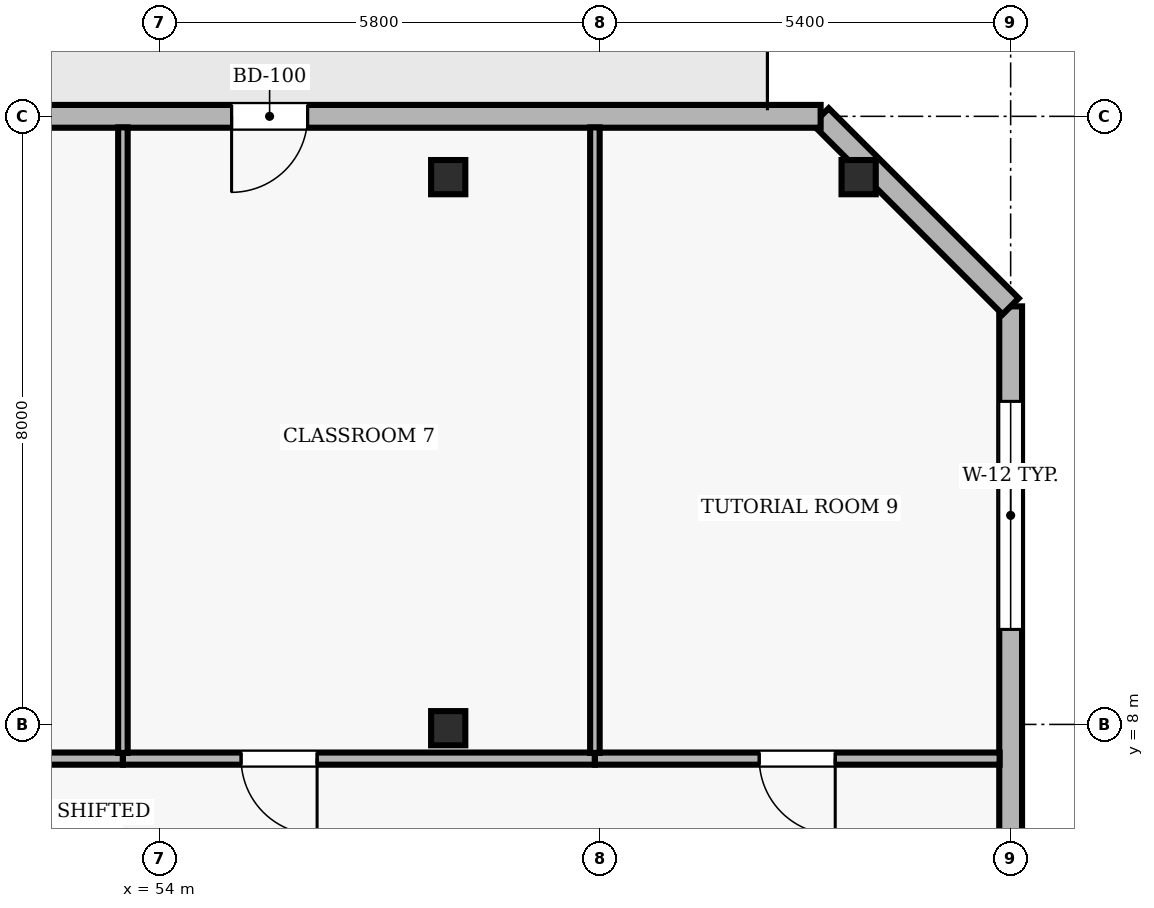
"""IFC4 building model, lengths in metres.
Left out: names, types, materials, properties, quantities, classifications, styles, units other than length and angle.
Written with IfcOpenShell. Run it as: python <this file> out.ifc"""

import sys

from ifc_helpers import new_model, si_unit, direction, frame, frame_2d, origin, origin_2d, place, context, subcontext, project, spatial, rectangle, hollow_rectangle, extrude, element, fill, save


model = new_model("IFC4")
c1 = context("Model", 3, precision=1e-05, world=origin(), true_north=direction((0.0, 1.0)))
c2 = subcontext(c1, "Body", "Model", "MODEL_VIEW")
j1 = project(units=[si_unit("LENGTHUNIT", "METRE"), si_unit("PLANEANGLEUNIT", "RADIAN")], contexts=[c1])
p1 = place(None, origin())
s1 = spatial("IfcSite", under=j1, at=p1, CompositionType="ELEMENT")
p2 = place(p1, origin())
s2 = spatial("IfcBuilding", under=s1, at=p2, CompositionType="ELEMENT")
p3 = place(p2, frame((0.0, 0.0, 234.3)))
s3 = spatial("IfcBuildingStorey", under=s2, at=p3, CompositionType="ELEMENT", Elevation=234.3)
for number, where, z_axis, x_axis in (
    (1, (57.8, 7.95, 0.0), (0.0, 0.0, 1.0), (1.0, 0.0, 0.0)),
    (2, (57.8, 15.2, 0.0), (0.0, 0.0, 1.0), (1.0, 0.0, 0.0)),
    (3, (63.2, 15.2, 0.0), (0.0, 0.0, 1.0), (1.0, 0.0, 0.0)),
):
    element("IfcColumn", number, at=place(p3, frame(where, z_axis=z_axis, x_axis=x_axis)), inside=s3, PredefinedType="COLUMN", context=c2, shape_type="SweptSolid", body=[
        extrude(hollow_rectangle(XDim=0.45, YDim=0.45, WallThickness=0.02, at=origin_2d()), origin(), (0.0, 0.0, 1.0), 3.9),
    ])
p4 = place(p3, frame((65.2, 2.5, 0.0), z_axis=(0.0, 0.0, 1.0), x_axis=(0.0, 1.0, 0.0)))
e4 = element("IfcWall", 4, at=p4, inside=s3, PredefinedType="SOLIDWALL", context=c2, shape_type="SweptSolid", body=[
    extrude(rectangle(XDim=11.0, YDim=0.3, at=frame_2d((5.5, 0.0))), origin(), (0.0, 0.0, 1.0), 3.64),
])
p5 = place(p4, frame((6.75, 0.0, 0.9)))
e5 = element("IfcOpeningElement", 5, at=p5, cuts=e4, PredefinedType="OPENING", context=c2, shape_type="SweptSolid", body=[
    extrude(rectangle(XDim=3.0, YDim=2.2, at=frame_2d((1.5, 1.1))), frame((0.0, 0.16, 0.0), z_axis=(0.0, -1.0, 0.0), x_axis=(1.0, 0.0, 0.0)), (0.0, 0.0, 1.0), 0.32),
])
p6 = place(p3, frame((65.2, 13.5, 0.0), z_axis=(0.0, 0.0, 1.0), x_axis=(-0.707106781187, 0.707106781187, 0.0)))
e6 = element("IfcWall", 6, at=p6, inside=s3, PredefinedType="SOLIDWALL", context=c2, shape_type="SweptSolid", body=[
    extrude(rectangle(XDim=3.536, YDim=0.3, at=frame_2d((1.768, 0.0))), origin(), (0.0, 0.0, 1.0), 3.64),
])
p7 = place(p3, frame((62.7, 16.0, 0.0), z_axis=(0.0, 0.0, 1.0), x_axis=(-1.0, 0.0, 0.0)))
e7 = element("IfcWall", 7, at=p7, inside=s3, PredefinedType="SOLIDWALL", context=c2, shape_type="SweptSolid", body=[
    extrude(rectangle(XDim=19.1, YDim=0.3, at=frame_2d((9.55, 0.0))), origin(), (0.0, 0.0, 1.0), 3.64),
])
p8 = place(p7, frame((6.75, 0.0, 0.0)))
e8 = element("IfcOpeningElement", 8, at=p8, cuts=e7, PredefinedType="OPENING", context=c2, shape_type="SweptSolid", body=[
    extrude(rectangle(XDim=1.0, YDim=2.2, at=frame_2d((0.5, 1.1))), frame((0.0, 0.16, 0.0), z_axis=(0.0, -1.0, 0.0), x_axis=(1.0, 0.0, 0.0)), (0.0, 0.0, 1.0), 0.32),
])
p9 = place(p7, frame((14.267, 0.0, 0.9)))
e9 = element("IfcOpeningElement", 9, at=p9, cuts=e7, PredefinedType="OPENING", context=c2, shape_type="SweptSolid", body=[
    extrude(rectangle(XDim=1.5, YDim=1.6, at=frame_2d((0.75, 0.8))), frame((0.0, 0.16, 0.0), z_axis=(0.0, -1.0, 0.0), x_axis=(1.0, 0.0, 0.0)), (0.0, 0.0, 1.0), 0.32),
])
p10 = place(p3, frame((53.52, 7.55, 0.0), z_axis=(0.0, 0.0, 1.0), x_axis=(-1.0, 0.0, 0.0)))
e10 = element("IfcWall", 10, at=p10, inside=s3, PredefinedType="PARTITIONING", context=c2, shape_type="SweptSolid", body=[
    extrude(rectangle(XDim=7.52, YDim=0.16, at=frame_2d((3.76, 0.0))), origin(), (0.0, 0.0, 1.0), 3.096),
])
p11 = place(p10, frame((3.26, 0.0, 0.0)))
e11 = element("IfcOpeningElement", 11, at=p11, cuts=e10, PredefinedType="OPENING", context=c2, shape_type="SweptSolid", body=[
    extrude(rectangle(XDim=1.0, YDim=2.1, at=frame_2d((0.5, 1.05))), frame((0.0, 0.09, 0.0), z_axis=(0.0, -1.0, 0.0), x_axis=(1.0, 0.0, 0.0)), (0.0, 0.0, 1.0), 0.18),
])
p12 = place(p3, frame((59.73, 7.55, 0.0), z_axis=(0.0, 0.0, 1.0), x_axis=(-1.0, 0.0, 0.0)))
e12 = element("IfcWall", 12, at=p12, inside=s3, PredefinedType="PARTITIONING", context=c2, shape_type="SweptSolid", body=[
    extrude(rectangle(XDim=6.21, YDim=0.16, at=frame_2d((3.105, 0.0))), origin(), (0.0, 0.0, 1.0), 3.096),
])
p13 = place(p12, frame((3.655, 0.0, 0.0)))
e13 = element("IfcOpeningElement", 13, at=p13, cuts=e12, PredefinedType="OPENING", context=c2, shape_type="SweptSolid", body=[
    extrude(rectangle(XDim=1.0, YDim=2.1, at=frame_2d((0.5, 1.05))), frame((0.0, 0.09, 0.0), z_axis=(0.0, -1.0, 0.0), x_axis=(1.0, 0.0, 0.0)), (0.0, 0.0, 1.0), 0.18),
])
p14 = place(p3, frame((65.055, 7.55, 0.0), z_axis=(0.0, 0.0, 1.0), x_axis=(-1.0, 0.0, 0.0)))
e14 = element("IfcWall", 14, at=p14, inside=s3, PredefinedType="PARTITIONING", context=c2, shape_type="SweptSolid", body=[
    extrude(rectangle(XDim=5.325, YDim=0.16, at=frame_2d((2.663, 0.0))), origin(), (0.0, 0.0, 1.0), 3.64),
])
p15 = place(p14, frame((2.163, 0.0, 0.0)))
e15 = element("IfcOpeningElement", 15, at=p15, cuts=e14, PredefinedType="OPENING", context=c2, shape_type="SweptSolid", body=[
    extrude(rectangle(XDim=1.0, YDim=2.1, at=frame_2d((0.5, 1.05))), frame((0.0, 0.09, 0.0), z_axis=(0.0, -1.0, 0.0), x_axis=(1.0, 0.0, 0.0)), (0.0, 0.0, 1.0), 0.18),
])
for number, where, z_axis, x_axis in (
    (16, (53.52, 7.625, 0.0), (0.0, 0.0, 1.0), (0.0, 1.0, 0.0)),
    (17, (59.73, 7.625, 0.0), (0.0, 0.0, 1.0), (0.0, 1.0, 0.0)),
):
    element("IfcWall", number, at=place(p3, frame(where, z_axis=z_axis, x_axis=x_axis)), inside=s3, PredefinedType="PARTITIONING", context=c2, shape_type="SweptSolid", body=[
        extrude(rectangle(XDim=8.23, YDim=0.125, at=frame_2d((4.115, 0.0))), origin(), (0.0, 0.0, 1.0), 3.64),
    ])
p16 = place(p5, origin())
e18 = element("IfcWindow", 18, at=p16, inside=s3, PartitioningType="SINGLE_PANEL", PredefinedType="WINDOW", context=c2, shape_type="SweptSolid", body=[
    extrude(rectangle(XDim=3.0, YDim=2.2, at=frame_2d((1.5, 1.1))), frame((0.0, 0.03, 0.0), z_axis=(0.0, -1.0, 0.0), x_axis=(1.0, 0.0, 0.0)), (0.0, 0.0, 1.0), 0.06),
])
fill(e5, e18)
p17 = place(p8, origin())
e19 = element("IfcDoor", 19, at=p17, inside=s3, OperationType="SINGLE_SWING_RIGHT", PredefinedType="DOOR", context=c2, shape_type="SweptSolid", body=[
    extrude(rectangle(XDim=1.0, YDim=2.2, at=frame_2d((0.5, 1.1))), frame((0.0, 0.025, 0.0), z_axis=(0.0, -1.0, 0.0), x_axis=(1.0, 0.0, 0.0)), (0.0, 0.0, 1.0), 0.05),
])
fill(e8, e19)
p18 = place(p13, origin())
e20 = element("IfcDoor", 20, at=p18, inside=s3, OperationType="SINGLE_SWING_LEFT", PredefinedType="DOOR", context=c2, shape_type="SweptSolid", body=[
    extrude(rectangle(XDim=1.0, YDim=2.1, at=frame_2d((0.5, 1.05))), frame((0.0, 0.025, 0.0), z_axis=(0.0, -1.0, 0.0), x_axis=(1.0, 0.0, 0.0)), (0.0, 0.0, 1.0), 0.05),
])
fill(e13, e20)
p19 = place(p15, origin())
e21 = element("IfcDoor", 21, at=p19, inside=s3, OperationType="SINGLE_SWING_LEFT", PredefinedType="DOOR", context=c2, shape_type="SweptSolid", body=[
    extrude(rectangle(XDim=1.0, YDim=2.1, at=frame_2d((0.5, 1.05))), frame((0.0, 0.025, 0.0), z_axis=(0.0, -1.0, 0.0), x_axis=(1.0, 0.0, 0.0)), (0.0, 0.0, 1.0), 0.05),
])
fill(e15, e21)
save(model, sys.argv[1])
